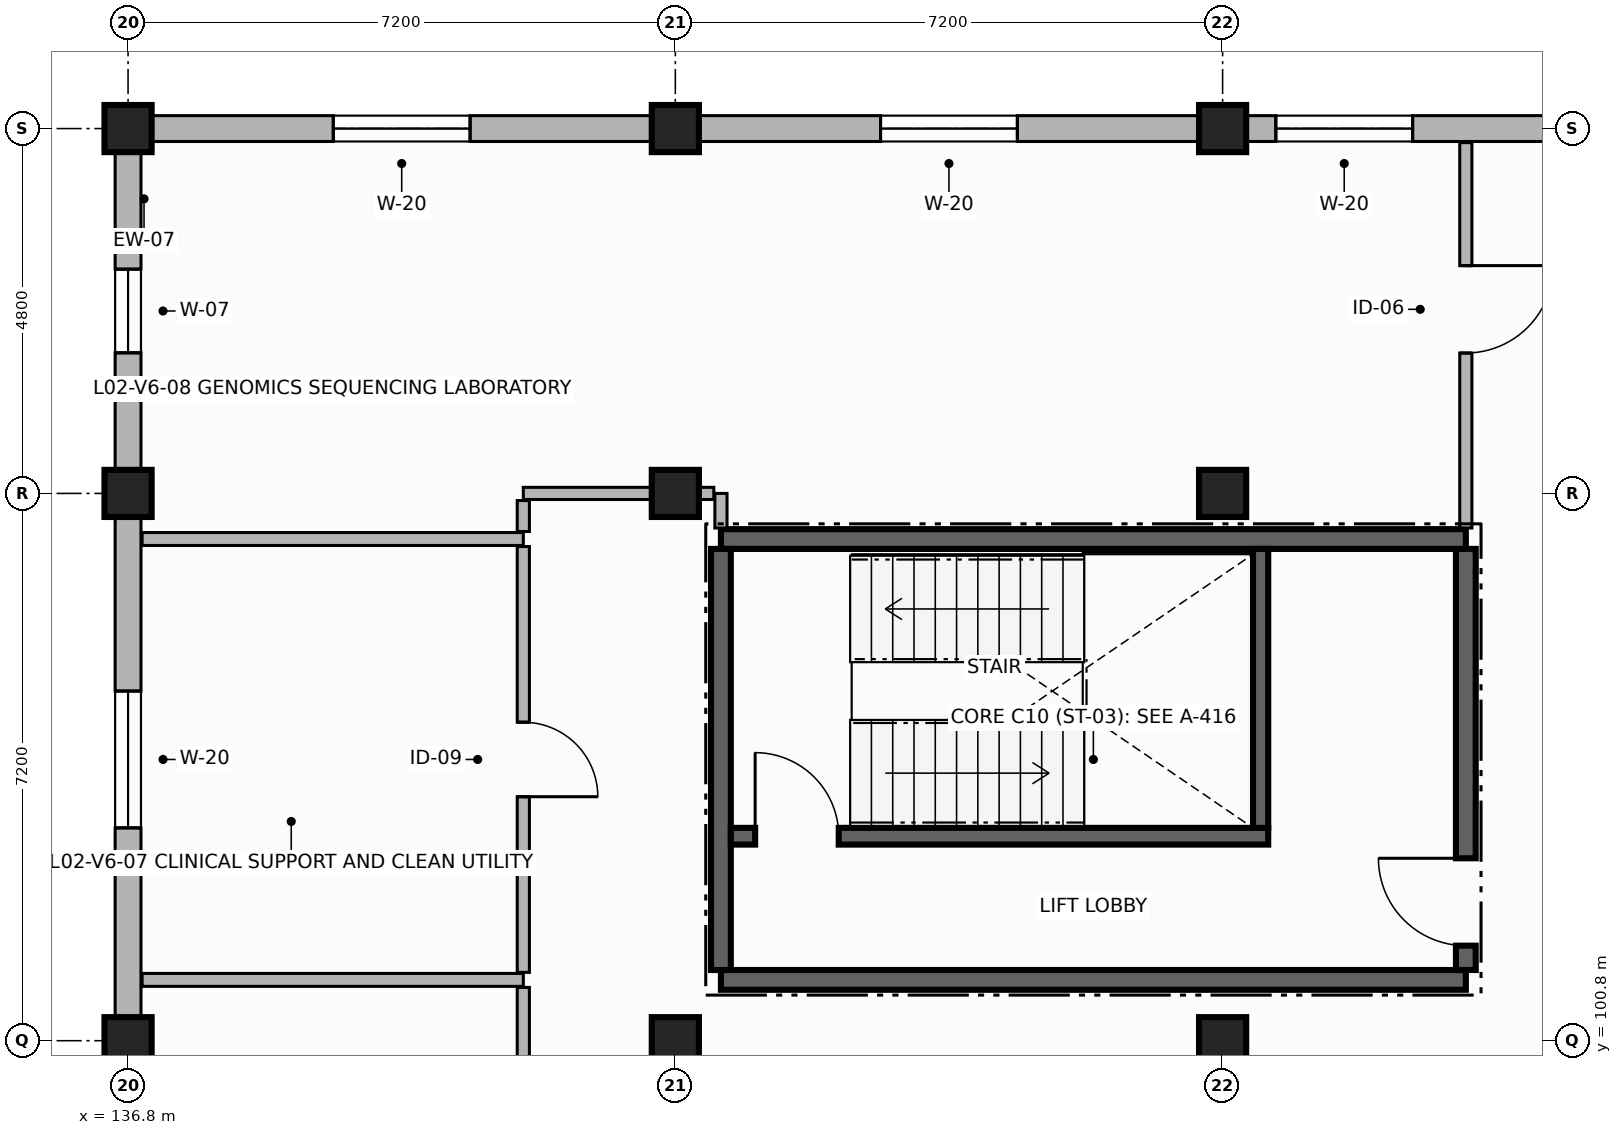
"""IFC4 building model, lengths in metres.
Left out: names, types, materials, properties, quantities, classifications, styles, units other than length and angle.
Written with IfcOpenShell. Run it as: python <this file> out.ifc"""

import sys

from ifc_helpers import new_model, si_unit, direction, frame, frame_2d, origin, origin_2d, place, context, subcontext, project, spatial, rectangle, extrude, element, fill, save


model = new_model("IFC4")
c1 = context("Model", 3, precision=1e-05, world=origin(), true_north=direction((0.0, 1.0)))
c2 = subcontext(c1, "Body", "Model", "MODEL_VIEW")
j1 = project(units=[si_unit("LENGTHUNIT", "METRE"), si_unit("PLANEANGLEUNIT", "RADIAN")], contexts=[c1])
p1 = place(None, origin())
s1 = spatial("IfcSite", under=j1, at=p1, CompositionType="ELEMENT")
p2 = place(p1, origin())
s2 = spatial("IfcBuilding", under=s1, at=p2, CompositionType="ELEMENT")
p3 = place(p2, frame((0.0, 0.0, 8.4)))
s3 = spatial("IfcBuildingStorey", under=s2, at=p3, CompositionType="ELEMENT", Elevation=8.4)
for number, where, z_axis, x_axis in (
    (1, (136.8, 100.8, 0.0), (0.0, 0.0, 1.0), (1.0, 0.0, 0.0)),
    (2, (136.8, 108.0, 0.0), (0.0, 0.0, 1.0), (1.0, 0.0, 0.0)),
    (3, (136.8, 112.8, 0.0), (0.0, 0.0, 1.0), (1.0, 0.0, 0.0)),
    (4, (144.0, 100.8, 0.0), (0.0, 0.0, 1.0), (1.0, 0.0, 0.0)),
    (5, (144.0, 108.0, 0.0), (0.0, 0.0, 1.0), (1.0, 0.0, 0.0)),
    (6, (144.0, 112.8, 0.0), (0.0, 0.0, 1.0), (1.0, 0.0, 0.0)),
    (7, (151.2, 100.8, 0.0), (0.0, 0.0, 1.0), (1.0, 0.0, 0.0)),
    (8, (151.2, 108.0, 0.0), (0.0, 0.0, 1.0), (1.0, 0.0, 0.0)),
    (9, (151.2, 112.8, 0.0), (0.0, 0.0, 1.0), (1.0, 0.0, 0.0)),
):
    element("IfcColumn", number, at=place(p3, frame(where, z_axis=z_axis, x_axis=x_axis)), inside=s3, PredefinedType="COLUMN", context=c2, shape_type="SweptSolid", body=[
        extrude(rectangle(XDim=0.62, YDim=0.62, at=origin_2d()), origin(), (0.0, 0.0, 1.0), 3.58),
    ])
p4 = place(p3, frame((158.4, 112.8, 0.0), z_axis=(0.0, 0.0, 1.0), x_axis=(-1.0, 0.0, 0.0)))
e10 = element("IfcWall", 10, at=p4, inside=s3, PredefinedType="SOLIDWALL", context=c2, shape_type="SweptSolid", body=[
    extrude(rectangle(XDim=7.2, YDim=0.34, at=frame_2d((3.6, 0.0))), origin(), (0.0, 0.0, 1.0), 2.91),
])
p5 = place(p4, frame((4.7, 0.0, 0.85)))
e11 = element("IfcOpeningElement", 11, at=p5, cuts=e10, PredefinedType="OPENING", context=c2, shape_type="SweptSolid", body=[
    extrude(rectangle(XDim=1.8, YDim=1.85, at=frame_2d((0.9, 0.925))), frame((0.0, 0.18, 0.0), z_axis=(0.0, -1.0, 0.0), x_axis=(1.0, 0.0, 0.0)), (0.0, 0.0, 1.0), 0.36),
])
p6 = place(p3, frame((151.2, 112.8, 0.0), z_axis=(0.0, 0.0, 1.0), x_axis=(-1.0, 0.0, 0.0)))
e12 = element("IfcWall", 12, at=p6, inside=s3, PredefinedType="SOLIDWALL", context=c2, shape_type="SweptSolid", body=[
    extrude(rectangle(XDim=7.2, YDim=0.34, at=frame_2d((3.6, 0.0))), origin(), (0.0, 0.0, 1.0), 2.91),
])
p7 = place(p6, frame((2.7, 0.0, 0.85)))
e13 = element("IfcOpeningElement", 13, at=p7, cuts=e12, PredefinedType="OPENING", context=c2, shape_type="SweptSolid", body=[
    extrude(rectangle(XDim=1.8, YDim=1.85, at=frame_2d((0.9, 0.925))), frame((0.0, 0.18, 0.0), z_axis=(0.0, -1.0, 0.0), x_axis=(1.0, 0.0, 0.0)), (0.0, 0.0, 1.0), 0.36),
])
p8 = place(p3, frame((144.0, 112.8, 0.0), z_axis=(0.0, 0.0, 1.0), x_axis=(-1.0, 0.0, 0.0)))
e14 = element("IfcWall", 14, at=p8, inside=s3, PredefinedType="SOLIDWALL", context=c2, shape_type="SweptSolid", body=[
    extrude(rectangle(XDim=7.2, YDim=0.34, at=frame_2d((3.6, 0.0))), origin(), (0.0, 0.0, 1.0), 2.91),
])
p9 = place(p8, frame((2.7, 0.0, 0.85)))
e15 = element("IfcOpeningElement", 15, at=p9, cuts=e14, PredefinedType="OPENING", context=c2, shape_type="SweptSolid", body=[
    extrude(rectangle(XDim=1.8, YDim=1.85, at=frame_2d((0.9, 0.925))), frame((0.0, 0.18, 0.0), z_axis=(0.0, -1.0, 0.0), x_axis=(1.0, 0.0, 0.0)), (0.0, 0.0, 1.0), 0.36),
])
p10 = place(p3, frame((136.8, 112.8, 0.0), z_axis=(0.0, 0.0, 1.0), x_axis=(0.0, -1.0, 0.0)))
e16 = element("IfcWall", 16, at=p10, inside=s3, PredefinedType="SOLIDWALL", context=c2, shape_type="SweptSolid", body=[
    extrude(rectangle(XDim=4.8, YDim=0.34, at=frame_2d((2.4, 0.0))), origin(), (0.0, 0.0, 1.0), 2.91),
])
p11 = place(p10, frame((1.85, 0.0, 0.85)))
e17 = element("IfcOpeningElement", 17, at=p11, cuts=e16, PredefinedType="OPENING", context=c2, shape_type="SweptSolid", body=[
    extrude(rectangle(XDim=1.1, YDim=1.85, at=frame_2d((0.55, 0.925))), frame((0.0, 0.18, 0.0), z_axis=(0.0, -1.0, 0.0), x_axis=(1.0, 0.0, 0.0)), (0.0, 0.0, 1.0), 0.36),
])
p12 = place(p3, frame((136.8, 108.0, 0.0), z_axis=(0.0, 0.0, 1.0), x_axis=(0.0, -1.0, 0.0)))
e18 = element("IfcWall", 18, at=p12, inside=s3, PredefinedType="SOLIDWALL", context=c2, shape_type="SweptSolid", body=[
    extrude(rectangle(XDim=7.2, YDim=0.34, at=frame_2d((3.6, 0.0))), origin(), (0.0, 0.0, 1.0), 2.91),
])
p13 = place(p12, frame((2.6, 0.0, 0.85)))
e19 = element("IfcOpeningElement", 19, at=p13, cuts=e18, PredefinedType="OPENING", context=c2, shape_type="SweptSolid", body=[
    extrude(rectangle(XDim=1.8, YDim=1.85, at=frame_2d((0.9, 0.925))), frame((0.0, 0.18, 0.0), z_axis=(0.0, -1.0, 0.0), x_axis=(1.0, 0.0, 0.0)), (0.0, 0.0, 1.0), 0.36),
])
p14 = place(p3, frame((136.8, 100.8, 0.0), z_axis=(0.0, 0.0, 1.0), x_axis=(0.0, -1.0, 0.0)))
e20 = element("IfcWall", 20, at=p14, inside=s3, PredefinedType="SOLIDWALL", context=c2, shape_type="SweptSolid", body=[
    extrude(rectangle(XDim=7.2, YDim=0.34, at=frame_2d((3.6, 0.0))), origin(), (0.0, 0.0, 1.0), 2.91),
])
p15 = place(p14, frame((2.7, 0.0, 0.85)))
e21 = element("IfcOpeningElement", 21, at=p15, cuts=e20, PredefinedType="OPENING", context=c2, shape_type="SweptSolid", body=[
    extrude(rectangle(XDim=1.8, YDim=1.85, at=frame_2d((0.9, 0.925))), frame((0.0, 0.18, 0.0), z_axis=(0.0, -1.0, 0.0), x_axis=(1.0, 0.0, 0.0)), (0.0, 0.0, 1.0), 0.36),
])
p16 = place(p3, frame((144.6, 101.6, 0.0), z_axis=(0.0, 0.0, 1.0), x_axis=(1.0, 0.0, 0.0)))
e22 = element("IfcWall", 22, at=p16, inside=s3, PredefinedType="SHEAR", context=c2, shape_type="SweptSolid", body=[
    extrude(rectangle(XDim=9.8, YDim=0.26, at=frame_2d((4.9, 0.0))), origin(), (0.0, 0.0, 1.0), 3.58),
])
p17 = place(p3, frame((154.4, 101.73, 0.0), z_axis=(0.0, 0.0, 1.0), x_axis=(0.0, 1.0, 0.0)))
e23 = element("IfcWall", 23, at=p17, inside=s3, PredefinedType="SHEAR", context=c2, shape_type="SweptSolid", body=[
    extrude(rectangle(XDim=5.54, YDim=0.26, at=frame_2d((2.77, 0.0))), origin(), (0.0, 0.0, 1.0), 3.58),
])
p18 = place(p17, frame((0.32, 0.0, 0.0)))
e24 = element("IfcOpeningElement", 24, at=p18, cuts=e23, PredefinedType="OPENING", context=c2, shape_type="SweptSolid", body=[
    extrude(rectangle(XDim=1.15, YDim=2.2, at=frame_2d((0.575, 1.1))), frame((0.0, 0.14, 0.0), z_axis=(0.0, -1.0, 0.0), x_axis=(1.0, 0.0, 0.0)), (0.0, 0.0, 1.0), 0.28),
])
p19 = place(p3, frame((154.4, 107.4, 0.0), z_axis=(0.0, 0.0, 1.0), x_axis=(-1.0, 0.0, 0.0)))
e25 = element("IfcWall", 25, at=p19, inside=s3, PredefinedType="SHEAR", context=c2, shape_type="SweptSolid", body=[
    extrude(rectangle(XDim=9.8, YDim=0.26, at=frame_2d((4.9, 0.0))), origin(), (0.0, 0.0, 1.0), 3.58),
])
p20 = place(p3, frame((144.6, 107.27, 0.0), z_axis=(0.0, 0.0, 1.0), x_axis=(0.0, -1.0, 0.0)))
e26 = element("IfcWall", 26, at=p20, inside=s3, PredefinedType="SHEAR", context=c2, shape_type="SweptSolid", body=[
    extrude(rectangle(XDim=5.54, YDim=0.26, at=frame_2d((2.77, 0.0))), origin(), (0.0, 0.0, 1.0), 3.58),
])
p21 = place(p3, frame((144.73, 103.49, 0.0), z_axis=(0.0, 0.0, 1.0), x_axis=(1.0, 0.0, 0.0)))
e27 = element("IfcWall", 27, at=p21, inside=s3, PredefinedType="SHEAR", context=c2, shape_type="SweptSolid", body=[
    extrude(rectangle(XDim=7.07, YDim=0.22, at=frame_2d((3.535, 0.0))), origin(), (0.0, 0.0, 1.0), 3.58),
])
p22 = place(p21, frame((0.32, 0.0, 0.0)))
e28 = element("IfcOpeningElement", 28, at=p22, cuts=e27, PredefinedType="OPENING", context=c2, shape_type="SweptSolid", body=[
    extrude(rectangle(XDim=1.1, YDim=2.15, at=frame_2d((0.55, 1.075))), frame((0.0, 0.12, 0.0), z_axis=(0.0, -1.0, 0.0), x_axis=(1.0, 0.0, 0.0)), (0.0, 0.0, 1.0), 0.24),
])
p23 = place(p3, frame((151.7, 103.6, 0.0), z_axis=(0.0, 0.0, 1.0), x_axis=(0.0, 1.0, 0.0)))
e29 = element("IfcWall", 29, at=p23, inside=s3, PredefinedType="SHEAR", context=c2, shape_type="SweptSolid", body=[
    extrude(rectangle(XDim=3.67, YDim=0.2, at=frame_2d((1.835, 0.0))), origin(), (0.0, 0.0, 1.0), 3.58),
])
p24 = place(p3, frame((136.985, 101.6, 0.0), z_axis=(0.0, 0.0, 1.0), x_axis=(1.0, 0.0, 0.0)))
e30 = element("IfcWall", 30, at=p24, inside=s3, PredefinedType="PARTITIONING", context=c2, shape_type="SweptSolid", body=[
    extrude(rectangle(XDim=5.015, YDim=0.17, at=frame_2d((2.507, 0.0))), origin(), (0.0, 0.0, 1.0), 2.89),
])
p25 = place(p3, frame((142.0, 101.501, 0.0), z_axis=(0.0, 0.0, 1.0), x_axis=(0.0, -1.0, 0.0)))
e31 = element("IfcWall", 31, at=p25, inside=s3, PredefinedType="PARTITIONING", context=c2, shape_type="SweptSolid", body=[
    extrude(rectangle(XDim=2.701, YDim=0.16, at=frame_2d((1.351, 0.0))), origin(), (0.0, 0.0, 1.0), 2.89),
])
p26 = place(p3, frame((136.985, 107.4, 0.0), z_axis=(0.0, 0.0, 1.0), x_axis=(1.0, 0.0, 0.0)))
e32 = element("IfcWall", 32, at=p26, inside=s3, PredefinedType="PARTITIONING", context=c2, shape_type="SweptSolid", body=[
    extrude(rectangle(XDim=5.015, YDim=0.17, at=frame_2d((2.507, 0.0))), origin(), (0.0, 0.0, 1.0), 2.89),
])
p27 = place(p3, frame((142.0, 107.301, 0.0), z_axis=(0.0, 0.0, 1.0), x_axis=(0.0, -1.0, 0.0)))
e33 = element("IfcWall", 33, at=p27, inside=s3, PredefinedType="PARTITIONING", context=c2, shape_type="SweptSolid", body=[
    extrude(rectangle(XDim=5.602, YDim=0.16, at=frame_2d((2.801, 0.0))), origin(), (0.0, 0.0, 1.0), 2.89),
])
p28 = place(p27, frame((2.311, 0.0, 0.0)))
e34 = element("IfcOpeningElement", 34, at=p28, cuts=e33, PredefinedType="OPENING", context=c2, shape_type="SweptSolid", body=[
    extrude(rectangle(XDim=0.98, YDim=2.15, at=frame_2d((0.49, 1.075))), frame((0.0, 0.09, 0.0), z_axis=(0.0, -1.0, 0.0), x_axis=(1.0, 0.0, 0.0)), (0.0, 0.0, 1.0), 0.18),
])
p29 = place(p3, frame((144.6, 107.545, 0.0), z_axis=(0.0, 0.0, 1.0), x_axis=(0.0, 1.0, 0.0)))
e35 = element("IfcWall", 35, at=p29, inside=s3, PredefinedType="PARTITIONING", context=c2, shape_type="SweptSolid", body=[
    extrude(rectangle(XDim=0.455, YDim=0.16, at=frame_2d((0.228, 0.0))), origin(), (0.0, 0.0, 1.0), 2.89),
])
p30 = place(p3, frame((144.506, 108.0, 0.0), z_axis=(0.0, 0.0, 1.0), x_axis=(-1.0, 0.0, 0.0)))
e36 = element("IfcWall", 36, at=p30, inside=s3, PredefinedType="PARTITIONING", context=c2, shape_type="SweptSolid", body=[
    extrude(rectangle(XDim=2.506, YDim=0.16, at=frame_2d((1.253, 0.0))), origin(), (0.0, 0.0, 1.0), 2.89),
])
p31 = place(p3, frame((142.0, 107.906, 0.0), z_axis=(0.0, 0.0, 1.0), x_axis=(0.0, -1.0, 0.0)))
e37 = element("IfcWall", 37, at=p31, inside=s3, PredefinedType="PARTITIONING", context=c2, shape_type="SweptSolid", body=[
    extrude(rectangle(XDim=0.407, YDim=0.16, at=frame_2d((0.204, 0.0))), origin(), (0.0, 0.0, 1.0), 2.89),
])
p32 = place(p3, frame((154.4, 112.615, 0.0), z_axis=(0.0, 0.0, 1.0), x_axis=(0.0, -1.0, 0.0)))
e38 = element("IfcWall", 38, at=p32, inside=s3, PredefinedType="PARTITIONING", context=c2, shape_type="SweptSolid", body=[
    extrude(rectangle(XDim=5.07, YDim=0.16, at=frame_2d((2.535, 0.0))), origin(), (0.0, 0.0, 1.0), 2.89),
])
p33 = place(p32, frame((1.618, 0.0, 0.0)))
e39 = element("IfcOpeningElement", 39, at=p33, cuts=e38, PredefinedType="OPENING", context=c2, shape_type="SweptSolid", body=[
    extrude(rectangle(XDim=1.15, YDim=2.25, at=frame_2d((0.575, 1.125))), frame((0.0, 0.09, 0.0), z_axis=(0.0, -1.0, 0.0), x_axis=(1.0, 0.0, 0.0)), (0.0, 0.0, 1.0), 0.18),
])
p34 = place(p5, origin())
e40 = element("IfcWindow", 40, at=p34, inside=s3, PartitioningType="SINGLE_PANEL", PredefinedType="WINDOW", context=c2, shape_type="SweptSolid", body=[
    extrude(rectangle(XDim=1.8, YDim=1.85, at=frame_2d((0.9, 0.925))), frame((0.0, 0.03, 0.0), z_axis=(0.0, -1.0, 0.0), x_axis=(1.0, 0.0, 0.0)), (0.0, 0.0, 1.0), 0.06),
])
fill(e11, e40)
p35 = place(p7, origin())
e41 = element("IfcWindow", 41, at=p35, inside=s3, PartitioningType="SINGLE_PANEL", PredefinedType="WINDOW", context=c2, shape_type="SweptSolid", body=[
    extrude(rectangle(XDim=1.8, YDim=1.85, at=frame_2d((0.9, 0.925))), frame((0.0, 0.03, 0.0), z_axis=(0.0, -1.0, 0.0), x_axis=(1.0, 0.0, 0.0)), (0.0, 0.0, 1.0), 0.06),
])
fill(e13, e41)
p36 = place(p9, origin())
e42 = element("IfcWindow", 42, at=p36, inside=s3, PartitioningType="SINGLE_PANEL", PredefinedType="WINDOW", context=c2, shape_type="SweptSolid", body=[
    extrude(rectangle(XDim=1.8, YDim=1.85, at=frame_2d((0.9, 0.925))), frame((0.0, 0.03, 0.0), z_axis=(0.0, -1.0, 0.0), x_axis=(1.0, 0.0, 0.0)), (0.0, 0.0, 1.0), 0.06),
])
fill(e15, e42)
p37 = place(p11, origin())
e43 = element("IfcWindow", 43, at=p37, inside=s3, PartitioningType="SINGLE_PANEL", PredefinedType="WINDOW", context=c2, shape_type="SweptSolid", body=[
    extrude(rectangle(XDim=1.1, YDim=1.85, at=frame_2d((0.55, 0.925))), frame((0.0, 0.03, 0.0), z_axis=(0.0, -1.0, 0.0), x_axis=(1.0, 0.0, 0.0)), (0.0, 0.0, 1.0), 0.06),
])
fill(e17, e43)
p38 = place(p13, origin())
e44 = element("IfcWindow", 44, at=p38, inside=s3, PartitioningType="SINGLE_PANEL", PredefinedType="WINDOW", context=c2, shape_type="SweptSolid", body=[
    extrude(rectangle(XDim=1.8, YDim=1.85, at=frame_2d((0.9, 0.925))), frame((0.0, 0.03, 0.0), z_axis=(0.0, -1.0, 0.0), x_axis=(1.0, 0.0, 0.0)), (0.0, 0.0, 1.0), 0.06),
])
fill(e19, e44)
p39 = place(p22, origin())
e45 = element("IfcDoor", 45, at=p39, inside=s3, OperationType="SINGLE_SWING_LEFT", PredefinedType="DOOR", context=c2, shape_type="SweptSolid", body=[
    extrude(rectangle(XDim=1.1, YDim=2.15, at=frame_2d((0.55, 1.075))), frame((0.0, 0.025, 0.0), z_axis=(0.0, -1.0, 0.0), x_axis=(1.0, 0.0, 0.0)), (0.0, 0.0, 1.0), 0.05),
])
fill(e28, e45)
p40 = place(p18, origin())
e46 = element("IfcDoor", 46, at=p40, inside=s3, OperationType="SINGLE_SWING_RIGHT", PredefinedType="DOOR", context=c2, shape_type="SweptSolid", body=[
    extrude(rectangle(XDim=1.15, YDim=2.2, at=frame_2d((0.575, 1.1))), frame((0.0, 0.025, 0.0), z_axis=(0.0, -1.0, 0.0), x_axis=(1.0, 0.0, 0.0)), (0.0, 0.0, 1.0), 0.05),
])
fill(e24, e46)
p41 = place(p28, origin())
e47 = element("IfcDoor", 47, at=p41, inside=s3, OperationType="SINGLE_SWING_RIGHT", PredefinedType="DOOR", context=c2, shape_type="SweptSolid", body=[
    extrude(rectangle(XDim=0.98, YDim=2.15, at=frame_2d((0.49, 1.075))), frame((0.0, 0.025, 0.0), z_axis=(0.0, -1.0, 0.0), x_axis=(1.0, 0.0, 0.0)), (0.0, 0.0, 1.0), 0.05),
])
fill(e34, e47)
p42 = place(p33, origin())
e48 = element("IfcDoor", 48, at=p42, inside=s3, OperationType="SINGLE_SWING_LEFT", PredefinedType="DOOR", context=c2, shape_type="SweptSolid", body=[
    extrude(rectangle(XDim=1.15, YDim=2.25, at=frame_2d((0.575, 1.125))), frame((0.0, 0.025, 0.0), z_axis=(0.0, -1.0, 0.0), x_axis=(1.0, 0.0, 0.0)), (0.0, 0.0, 1.0), 0.05),
])
fill(e39, e48)
save(model, sys.argv[1])
